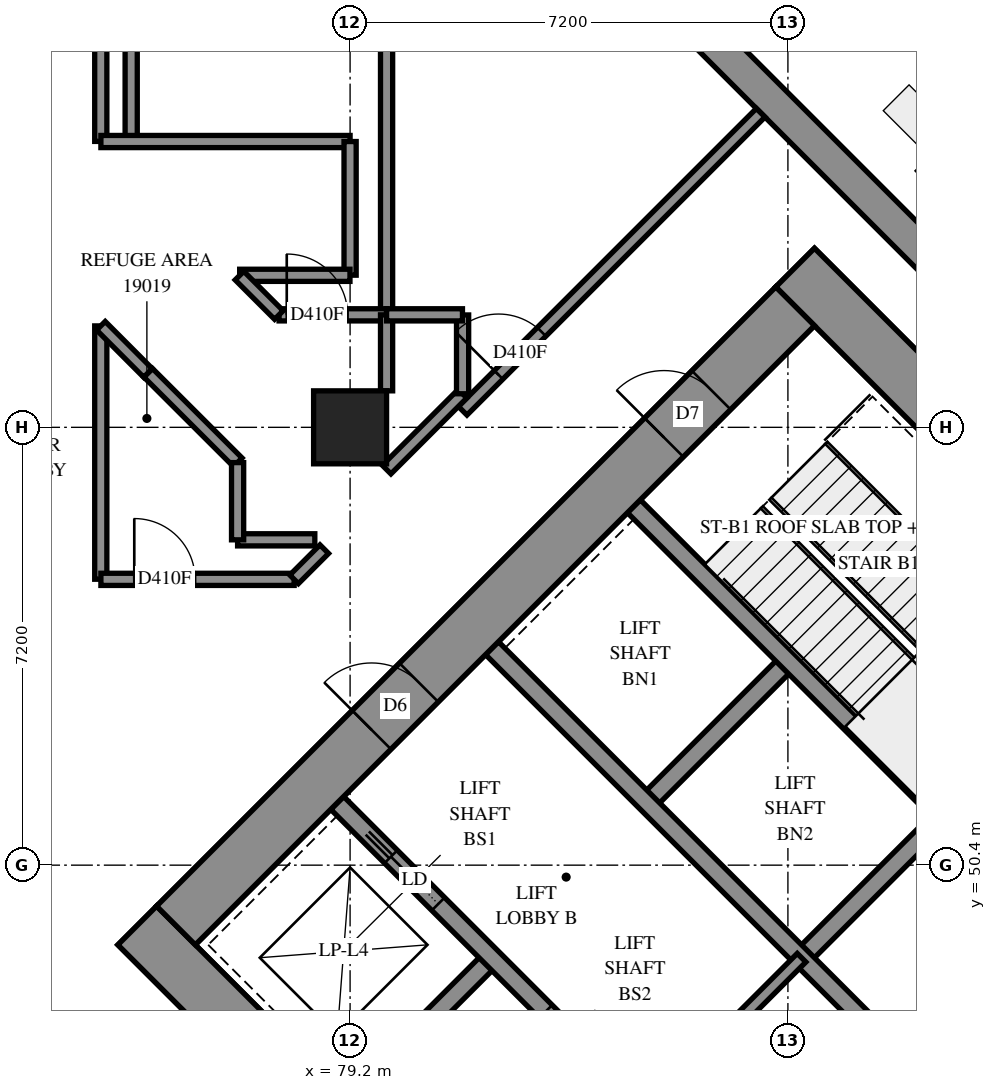
"""IFC4 building model, lengths in metres.
Left out: names, types, materials, properties, quantities, classifications, styles, units other than length and angle.
Written with IfcOpenShell. Run it as: python <this file> out.ifc"""

import sys

from ifc_helpers import new_model, si_unit, direction, frame, frame_2d, origin, origin_2d, place, context, subcontext, project, spatial, polyline, rectangle, outline, extrude, element, fill, save


model = new_model("IFC4")
c1 = context("Model", 3, precision=1e-05, world=origin(), true_north=direction((0.0, 1.0)))
c2 = subcontext(c1, "Body", "Model", "MODEL_VIEW")
j1 = project(units=[si_unit("LENGTHUNIT", "METRE"), si_unit("PLANEANGLEUNIT", "RADIAN")], contexts=[c1])
p1 = place(None, origin())
s1 = spatial("IfcSite", under=j1, at=p1, CompositionType="ELEMENT")
p2 = place(p1, origin())
s2 = spatial("IfcBuilding", under=s1, at=p2, CompositionType="ELEMENT")
p3 = place(p2, frame((0.0, 0.0, 72.0)))
s3 = spatial("IfcBuildingStorey", under=s2, at=p3, CompositionType="ELEMENT", Elevation=72.0)
p4 = place(p3, frame((79.2, 57.6, 0.0), z_axis=(0.0, 0.0, 1.0), x_axis=(1.0, 0.0, 0.0)))
e1 = element("IfcColumn", 1, at=p4, inside=s3, PredefinedType="COLUMN", context=c2, shape_type="SweptSolid", body=[
    extrude(rectangle(XDim=1.2, YDim=1.2, at=origin_2d()), origin(), (0.0, 0.0, 1.0), 4.7),
])
p5 = place(p3, frame((75.7, 49.408, -0.3), z_axis=(0.0, 0.0, 1.0), x_axis=(0.7071098676, -0.7071036948, 0.0)))
e2 = element("IfcWall", 2, at=p5, inside=s3, PredefinedType="SHEAR", context=c2, shape_type="SweptSolid", body=[
    extrude(rectangle(XDim=16.2, YDim=0.9, at=frame_2d((8.1, 0.0))), origin(), (0.0, 0.0, 1.0), 4.3),
])
p6 = place(p3, frame((86.519, 60.227, -0.3), z_axis=(0.0, 0.0, 1.0), x_axis=(0.7071036948, -0.7071098676, 0.0)))
e3 = element("IfcWall", 3, at=p6, inside=s3, PredefinedType="SHEAR", context=c2, shape_type="SweptSolid", body=[
    extrude(rectangle(XDim=16.2, YDim=0.9, at=frame_2d((8.1, 0.0))), origin(), (0.0, 0.0, 1.0), 4.3),
])
p7 = place(p6, frame((10.9, 0.0, 0.3)))
e4 = element("IfcOpeningElement", 4, at=p7, cuts=e3, PredefinedType="OPENING", context=c2, shape_type="SweptSolid", body=[
    extrude(rectangle(XDim=0.8, YDim=2.1, at=frame_2d((0.4, 1.05))), frame((0.0, 0.46, 0.0), z_axis=(0.0, -1.0, 0.0), x_axis=(1.0, 0.0, 0.0)), (0.0, 0.0, 1.0), 0.92),
])
p8 = place(p3, frame((76.336, 49.408, -0.3), z_axis=(0.0, 0.0, 1.0), x_axis=(0.7071067812, 0.7071067812, 0.0)))
e5 = element("IfcWall", 5, at=p8, inside=s3, PredefinedType="SHEAR", context=c2, shape_type="SweptSolid", body=[
    extrude(rectangle(XDim=14.4, YDim=0.9, at=frame_2d((7.2, 0.0))), origin(), (0.0, 0.0, 1.0), 4.3),
])
p9 = place(p8, frame((4.55, 0.0, 0.3)))
e6 = element("IfcOpeningElement", 6, at=p9, cuts=e5, PredefinedType="OPENING", context=c2, shape_type="SweptSolid", body=[
    extrude(rectangle(XDim=1.1, YDim=2.1, at=frame_2d((0.55, 1.05))), frame((0.0, 0.46, 0.0), z_axis=(0.0, -1.0, 0.0), x_axis=(1.0, 0.0, 0.0)), (0.0, 0.0, 1.0), 0.92),
])
p10 = place(p8, frame((11.35, 0.0, 0.3)))
e7 = element("IfcOpeningElement", 7, at=p10, cuts=e5, PredefinedType="OPENING", context=c2, shape_type="SweptSolid", body=[
    extrude(rectangle(XDim=1.1, YDim=2.1, at=frame_2d((0.55, 1.05))), frame((0.0, 0.46, 0.0), z_axis=(0.0, -1.0, 0.0), x_axis=(1.0, 0.0, 0.0)), (0.0, 0.0, 1.0), 0.92),
])
p11 = place(p3, frame((87.155, 38.589, -0.3), z_axis=(0.0, 0.0, 1.0), x_axis=(0.7071067812, 0.7071067812, 0.0)))
e8 = element("IfcWall", 8, at=p11, inside=s3, PredefinedType="SHEAR", context=c2, shape_type="SweptSolid", body=[
    extrude(rectangle(XDim=14.4, YDim=0.9, at=frame_2d((7.2, 0.0))), origin(), (0.0, 0.0, 1.0), 4.3),
])
p12 = place(p11, frame((4.55, 0.0, 0.3)))
e9 = element("IfcOpeningElement", 9, at=p12, cuts=e8, PredefinedType="OPENING", context=c2, shape_type="SweptSolid", body=[
    extrude(rectangle(XDim=1.1, YDim=2.1, at=frame_2d((0.55, 1.05))), frame((0.0, 0.46, 0.0), z_axis=(0.0, -1.0, 0.0), x_axis=(1.0, 0.0, 0.0)), (0.0, 0.0, 1.0), 0.92),
])
p13 = place(p11, frame((11.35, 0.0, 0.3)))
e10 = element("IfcOpeningElement", 10, at=p13, cuts=e8, PredefinedType="OPENING", context=c2, shape_type="SweptSolid", body=[
    extrude(rectangle(XDim=1.1, YDim=2.1, at=frame_2d((0.55, 1.05))), frame((0.0, 0.46, 0.0), z_axis=(0.0, -1.0, 0.0), x_axis=(1.0, 0.0, 0.0)), (0.0, 0.0, 1.0), 0.92),
])
for number, where, z_axis, x_axis in (
    (11, (79.2, 46.544, 0.0), (0.0, 0.0, 1.0), (0.707, 0.707, 0.0)),
    (12, (84.079, 51.423, 0.0), (0.0, 0.0, 1.0), (0.707, 0.707, 0.0)),
):
    element("IfcWall", number, at=place(p3, frame(where, z_axis=z_axis, x_axis=x_axis)), inside=s3, PredefinedType="SOLIDWALL", context=c2, shape_type="SweptSolid", body=[
        extrude(rectangle(XDim=3.3, YDim=0.3, at=frame_2d((1.65, 0.0))), origin(), (0.0, 0.0, 1.0), 4.7),
    ])
p14 = place(p3, frame((86.625, 48.878, 0.0), z_axis=(0.0, 0.0, 1.0), x_axis=(0.7071067812, 0.7071067812, 0.0)))
e13 = element("IfcWall", 13, at=p14, inside=s3, PredefinedType="SOLIDWALL", context=c2, shape_type="SweptSolid", body=[
    extrude(rectangle(XDim=3.3, YDim=0.3, at=frame_2d((1.65, 0.0))), origin(), (0.0, 0.0, 1.0), 4.7),
])
p15 = place(p3, frame((78.988, 51.423, 0.0), z_axis=(0.0, 0.0, 1.0), x_axis=(0.7071067812, -0.7071067812, 0.0)))
e14 = element("IfcWall", 14, at=p15, inside=s3, PredefinedType="SOLIDWALL", context=c2, shape_type="SweptSolid", body=[
    extrude(rectangle(XDim=14.4, YDim=0.3, at=frame_2d((7.2, 0.0))), origin(), (0.0, 0.0, 1.0), 4.7),
])
p16 = place(p15, frame((1.25, 0.0, 0.0)))
e15 = element("IfcOpeningElement", 15, at=p16, cuts=e14, PredefinedType="OPENING", context=c2, shape_type="SweptSolid", body=[
    extrude(rectangle(XDim=1.1, YDim=2.1, at=frame_2d((0.55, 1.05))), frame((0.0, 0.16, 0.0), z_axis=(0.0, -1.0, 0.0), x_axis=(1.0, 0.0, 0.0)), (0.0, 0.0, 1.0), 0.32),
])
p17 = place(p15, frame((4.85, 0.0, 0.0)))
e16 = element("IfcOpeningElement", 16, at=p17, cuts=e14, PredefinedType="OPENING", context=c2, shape_type="SweptSolid", body=[
    extrude(rectangle(XDim=1.1, YDim=2.1, at=frame_2d((0.55, 1.05))), frame((0.0, 0.16, 0.0), z_axis=(0.0, -1.0, 0.0), x_axis=(1.0, 0.0, 0.0)), (0.0, 0.0, 1.0), 0.32),
])
p18 = place(p15, frame((8.45, 0.0, 0.0)))
e17 = element("IfcOpeningElement", 17, at=p18, cuts=e14, PredefinedType="OPENING", context=c2, shape_type="SweptSolid", body=[
    extrude(rectangle(XDim=1.1, YDim=2.1, at=frame_2d((0.55, 1.05))), frame((0.0, 0.16, 0.0), z_axis=(0.0, -1.0, 0.0), x_axis=(1.0, 0.0, 0.0)), (0.0, 0.0, 1.0), 0.32),
])
p19 = place(p15, frame((12.05, 0.0, 0.0)))
e18 = element("IfcOpeningElement", 18, at=p19, cuts=e14, PredefinedType="OPENING", context=c2, shape_type="SweptSolid", body=[
    extrude(rectangle(XDim=1.1, YDim=2.1, at=frame_2d((0.55, 1.05))), frame((0.0, 0.16, 0.0), z_axis=(0.0, -1.0, 0.0), x_axis=(1.0, 0.0, 0.0)), (0.0, 0.0, 1.0), 0.32),
])
p20 = place(p3, frame((81.534, 53.969, 0.0), z_axis=(0.0, 0.0, 1.0), x_axis=(0.707103309, -0.7071102534, 0.0)))
e19 = element("IfcWall", 19, at=p20, inside=s3, PredefinedType="SOLIDWALL", context=c2, shape_type="SweptSolid", body=[
    extrude(rectangle(XDim=14.4, YDim=0.3, at=frame_2d((7.2, 0.0))), origin(), (0.0, 0.0, 1.0), 4.7),
])
p21 = place(p20, frame((12.05, 0.0, 0.0)))
e20 = element("IfcOpeningElement", 20, at=p21, cuts=e19, PredefinedType="OPENING", context=c2, shape_type="SweptSolid", body=[
    extrude(rectangle(XDim=1.1, YDim=2.1, at=frame_2d((0.55, 1.05))), frame((0.0, 0.16, 0.0), z_axis=(0.0, -1.0, 0.0), x_axis=(1.0, 0.0, 0.0)), (0.0, 0.0, 1.0), 0.32),
])
p22 = place(p3, frame((83.867, 56.302, 0.0), z_axis=(0.0, 0.0, 1.0), x_axis=(0.7071137256, -0.7070998367, 0.0)))
e21 = element("IfcWall", 21, at=p22, inside=s3, PredefinedType="SOLIDWALL", context=c2, shape_type="SweptSolid", body=[
    extrude(rectangle(XDim=7.2, YDim=0.3, at=frame_2d((3.6, 0.0))), origin(), (0.0, 0.0, 1.0), 4.7),
])
p23 = place(p3, frame((111.055, 38.059, 0.0), z_axis=(0.0, 0.0, 1.0), x_axis=(-0.7071078702, 0.7071056922, 0.0)))
e22 = element("IfcWall", 22, at=p23, inside=s3, PredefinedType="SOLIDWALL", context=c2, shape_type="SweptSolid", body=[
    extrude(outline(polyline([(-0.275, -0.275), (46.028, -0.275), (45.8, 0.275), (0.275, 0.275), (-0.275, -0.275)])), origin(), (0.0, 0.0, 1.0), 4.7),
])
p24 = place(p3, frame((112.929, 39.756, 0.0), z_axis=(0.0, 0.0, 1.0), x_axis=(-0.7071067812, 0.7071067812, 0.0)))
e23 = element("IfcWall", 23, at=p24, inside=s3, PredefinedType="SOLIDWALL", context=c2, shape_type="SweptSolid", body=[
    extrude(outline(polyline([(-0.1, -0.1), (47.126, -0.1), (47.044, 0.1), (0.1, 0.1), (-0.1, -0.1)])), origin(), (0.0, 0.0, 1.0), 4.7),
])
p25 = place(p3, frame((84.079, 46.332, 0.0), z_axis=(0.0, 0.0, 1.0), x_axis=(0.7071067812, 0.7071067812, 0.0)))
e24 = element("IfcWall", 24, at=p25, inside=s3, PredefinedType="PARTITIONING", context=c2, shape_type="SweptSolid", body=[
    extrude(rectangle(XDim=3.6, YDim=0.2, at=frame_2d((1.8, 0.0))), origin(), (0.0, 0.0, 1.0), 4.7),
])
p26 = place(p3, frame((75.6, 62.3, 0.0), z_axis=(0.0, 0.0, 1.0), x_axis=(0.0, 1.0, 0.0)))
e25 = element("IfcWall", 25, at=p26, inside=s3, PredefinedType="PARTITIONING", context=c2, shape_type="SweptSolid", body=[
    extrude(rectangle(XDim=7.95, YDim=0.2, at=frame_2d((3.975, 0.0))), origin(), (0.0, 0.0, 1.0), 4.7),
])
p27 = place(p3, frame((81.052, 57.873, 0.0), z_axis=(0.0, 0.0, 1.0), x_axis=(0.7070995666, 0.7071139957, 0.0)))
e26 = element("IfcWall", 26, at=p27, inside=s3, PredefinedType="PARTITIONING", context=c2, shape_type="SweptSolid", body=[
    extrude(rectangle(XDim=6.93, YDim=0.2, at=frame_2d((3.465, 0.0))), origin(), (0.0, 0.0, 1.0), 4.7),
])
p28 = place(p27, frame((0.835, 0.0, 0.0)))
e27 = element("IfcOpeningElement", 27, at=p28, cuts=e26, PredefinedType="OPENING", context=c2, shape_type="SweptSolid", body=[
    extrude(rectangle(XDim=1.0, YDim=2.1, at=frame_2d((0.5, 1.05))), frame((0.0, 0.11, 0.0), z_axis=(0.0, -1.0, 0.0), x_axis=(1.0, 0.0, 0.0)), (0.0, 0.0, 1.0), 0.22),
])
p29 = place(p3, frame((75.1, 62.302, 0.0), z_axis=(0.0, 0.0, 1.0), x_axis=(0.0, 1.0, 0.0)))
e28 = element("IfcWall", 28, at=p29, inside=s3, PredefinedType="PARTITIONING", context=c2, shape_type="SweptSolid", body=[
    extrude(rectangle(XDim=5.598, YDim=0.2, at=frame_2d((2.799, 0.0))), origin(), (0.0, 0.0, 1.0), 4.7),
])
p30 = place(p3, frame((79.8, 59.45, 0.0), z_axis=(0.0, 0.0, 1.0), x_axis=(0.0, 1.0, 0.0)))
e29 = element("IfcWall", 29, at=p30, inside=s3, PredefinedType="PARTITIONING", context=c2, shape_type="SweptSolid", body=[
    extrude(rectangle(XDim=4.75, YDim=0.2, at=frame_2d((2.375, 0.0))), origin(), (0.0, 0.0, 1.0), 4.7),
])
p31 = place(p3, frame((75.1, 55.102, 0.0), z_axis=(0.0, 0.0, 1.0), x_axis=(0.0, 1.0, 0.0)))
e30 = element("IfcWall", 30, at=p31, inside=s3, PredefinedType="PARTITIONING", context=c2, shape_type="SweptSolid", body=[
    extrude(rectangle(XDim=4.166, YDim=0.2, at=frame_2d((2.083, 0.0))), origin(), (0.0, 0.0, 1.0), 4.7),
])
p32 = place(p3, frame((75.102, 62.3, 0.0), z_axis=(0.0, 0.0, 1.0), x_axis=(1.0, 0.0, 0.0)))
e31 = element("IfcWall", 31, at=p32, inside=s3, PredefinedType="PARTITIONING", context=c2, shape_type="SweptSolid", body=[
    extrude(rectangle(XDim=4.098, YDim=0.2, at=frame_2d((2.049, 0.0))), origin(), (0.0, 0.0, 1.0), 4.7),
])
p33 = place(p3, frame((75.102, 55.1, 0.0), z_axis=(0.0, 0.0, 1.0), x_axis=(1.0, 0.0, 0.0)))
e32 = element("IfcWall", 32, at=p33, inside=s3, PredefinedType="PARTITIONING", context=c2, shape_type="SweptSolid", body=[
    extrude(rectangle(XDim=3.178, YDim=0.2, at=frame_2d((1.589, 0.0))), origin(), (0.0, 0.0, 1.0), 4.7),
])
p34 = place(p33, frame((0.549, 0.0, 0.0)))
e33 = element("IfcOpeningElement", 33, at=p34, cuts=e32, PredefinedType="OPENING", context=c2, shape_type="SweptSolid", body=[
    extrude(rectangle(XDim=1.0, YDim=2.1, at=frame_2d((0.5, 1.05))), frame((0.0, 0.11, 0.0), z_axis=(0.0, -1.0, 0.0), x_axis=(1.0, 0.0, 0.0)), (0.0, 0.0, 1.0), 0.22),
])
p35 = place(p3, frame((79.2, 60.102, 0.0), z_axis=(0.0, 0.0, 1.0), x_axis=(0.0, 1.0, 0.0)))
e34 = element("IfcWall", 34, at=p35, inside=s3, PredefinedType="PARTITIONING", context=c2, shape_type="SweptSolid", body=[
    extrude(rectangle(XDim=2.198, YDim=0.2, at=frame_2d((1.099, 0.0))), origin(), (0.0, 0.0, 1.0), 4.7),
])
p36 = place(p3, frame((75.879, 58.497, 0.0), z_axis=(0.0, 0.0, 1.0), x_axis=(0.7075866635, -0.706626573, 0.0)))
e35 = element("IfcWall", 35, at=p36, inside=s3, PredefinedType="PARTITIONING", context=c2, shape_type="SweptSolid", body=[
    extrude(rectangle(XDim=2.083, YDim=0.2, at=frame_2d((1.042, 0.0))), origin(), (0.0, 0.0, 1.0), 4.7),
])
p37 = place(p3, frame((77.384, 60.1, 0.0), z_axis=(0.0, 0.0, 1.0), x_axis=(1.0, 0.0, 0.0)))
e36 = element("IfcWall", 36, at=p37, inside=s3, PredefinedType="PARTITIONING", context=c2, shape_type="SweptSolid", body=[
    extrude(rectangle(XDim=1.814, YDim=0.2, at=frame_2d((0.907, 0.0))), origin(), (0.0, 0.0, 1.0), 4.7),
])
p38 = place(p3, frame((78.032, 59.45, 0.0), z_axis=(0.0, 0.0, 1.0), x_axis=(1.0, 0.0, 0.0)))
e37 = element("IfcWall", 37, at=p38, inside=s3, PredefinedType="PARTITIONING", context=c2, shape_type="SweptSolid", body=[
    extrude(rectangle(XDim=1.768, YDim=0.2, at=frame_2d((0.884, 0.0))), origin(), (0.0, 0.0, 1.0), 4.7),
])
p39 = place(p38, frame((0.126, 0.0, 0.0)))
e38 = element("IfcOpeningElement", 38, at=p39, cuts=e37, PredefinedType="OPENING", context=c2, shape_type="SweptSolid", body=[
    extrude(rectangle(XDim=1.0, YDim=2.1, at=frame_2d((0.5, 1.05))), frame((0.0, 0.11, 0.0), z_axis=(0.0, -1.0, 0.0), x_axis=(1.0, 0.0, 0.0)), (0.0, 0.0, 1.0), 0.22),
])
p40 = place(p3, frame((79.801, 56.905, 0.0), z_axis=(0.0, 0.0, 1.0), x_axis=(0.7071067812, 0.7071067812, 0.0)))
e39 = element("IfcWall", 39, at=p40, inside=s3, PredefinedType="PARTITIONING", context=c2, shape_type="SweptSolid", body=[
    extrude(rectangle(XDim=1.765, YDim=0.2, at=frame_2d((0.882, 0.0))), origin(), (0.0, 0.0, 1.0), 4.7),
])
p41 = place(p3, frame((81.05, 58.152, 0.0), z_axis=(0.0, 0.0, 1.0), x_axis=(0.0, 1.0, 0.0)))
e40 = element("IfcWall", 40, at=p41, inside=s3, PredefinedType="PARTITIONING", context=c2, shape_type="SweptSolid", body=[
    extrude(rectangle(XDim=1.296, YDim=0.2, at=frame_2d((0.648, 0.0))), origin(), (0.0, 0.0, 1.0), 4.7),
])
for number, where, z_axis, x_axis in (
    (41, (77.35, 55.75, 0.0), (0.0, 0.0, 1.0), (1.0, 0.0, 0.0)),
    (42, (77.35, 55.75, 0.0), (0.0, 0.0, 1.0), (0.0, 1.0, 0.0)),
):
    element("IfcWall", number, at=place(p3, frame(where, z_axis=z_axis, x_axis=x_axis)), inside=s3, PredefinedType="PARTITIONING", context=c2, shape_type="SweptSolid", body=[
        extrude(rectangle(XDim=1.27, YDim=0.2, at=frame_2d((0.635, 0.0))), origin(), (0.0, 0.0, 1.0), 4.7),
    ])
p42 = place(p3, frame((79.8, 58.2, 0.0), z_axis=(0.0, 0.0, 1.0), x_axis=(0.0, 1.0, 0.0)))
e43 = element("IfcWall", 43, at=p42, inside=s3, PredefinedType="PARTITIONING", context=c2, shape_type="SweptSolid", body=[
    extrude(rectangle(XDim=1.25, YDim=0.2, at=frame_2d((0.625, 0.0))), origin(), (0.0, 0.0, 1.0), 4.7),
])
p43 = place(p3, frame((79.8, 59.45, 0.0), z_axis=(0.0, 0.0, 1.0), x_axis=(1.0, 0.0, 0.0)))
e44 = element("IfcWall", 44, at=p43, inside=s3, PredefinedType="PARTITIONING", context=c2, shape_type="SweptSolid", body=[
    extrude(rectangle(XDim=1.248, YDim=0.2, at=frame_2d((0.624, 0.0))), origin(), (0.0, 0.0, 1.0), 4.7),
])
p44 = place(p3, frame((75.102, 59.27, 0.0), z_axis=(0.0, 0.0, 1.0), x_axis=(0.7061937975, -0.7080185876, 0.0)))
e45 = element("IfcWall", 45, at=p44, inside=s3, PredefinedType="PARTITIONING", context=c2, shape_type="SweptSolid", body=[
    extrude(rectangle(XDim=1.096, YDim=0.2, at=frame_2d((0.548, 0.0))), origin(), (0.0, 0.0, 1.0), 4.7),
])
p45 = place(p3, frame((77.381, 60.095, 0.0), z_axis=(0.0, 0.0, 1.0), x_axis=(0.7071067812, -0.7071067812, 0.0)))
e46 = element("IfcWall", 46, at=p45, inside=s3, PredefinedType="PARTITIONING", context=c2, shape_type="SweptSolid", body=[
    extrude(rectangle(XDim=0.916, YDim=0.2, at=frame_2d((0.458, 0.0))), origin(), (0.0, 0.0, 1.0), 4.7),
])
p46 = place(p3, frame((78.279, 55.1, 0.0), z_axis=(0.0, 0.0, 1.0), x_axis=(0.7071067812, 0.7071067812, 0.0)))
e47 = element("IfcWall", 47, at=p46, inside=s3, PredefinedType="PARTITIONING", context=c2, shape_type="SweptSolid", body=[
    extrude(rectangle(XDim=0.701, YDim=0.2, at=frame_2d((0.351, 0.0))), origin(), (0.0, 0.0, 1.0), 4.7),
])
p47 = place(p9, origin())
e48 = element("IfcDoor", 48, at=p47, inside=s3, OperationType="DOUBLE_DOOR_SINGLE_SWING", PredefinedType="DOOR", context=c2, shape_type="SweptSolid", body=[
    extrude(rectangle(XDim=1.1, YDim=2.1, at=frame_2d((0.55, 1.05))), frame((0.0, 0.025, 0.0), z_axis=(0.0, -1.0, 0.0), x_axis=(1.0, 0.0, 0.0)), (0.0, 0.0, 1.0), 0.05),
])
fill(e6, e48)
p48 = place(p10, origin())
e49 = element("IfcDoor", 49, at=p48, inside=s3, OperationType="SINGLE_SWING_LEFT", PredefinedType="DOOR", context=c2, shape_type="SweptSolid", body=[
    extrude(rectangle(XDim=1.1, YDim=2.1, at=frame_2d((0.55, 1.05))), frame((0.0, 0.025, 0.0), z_axis=(0.0, -1.0, 0.0), x_axis=(1.0, 0.0, 0.0)), (0.0, 0.0, 1.0), 0.05),
])
fill(e7, e49)
p49 = place(p16, origin())
e50 = element("IfcDoor", 50, at=p49, inside=s3, OperationType="SLIDING_TO_LEFT", PredefinedType="DOOR", context=c2, shape_type="SweptSolid", body=[
    extrude(rectangle(XDim=1.1, YDim=2.1, at=frame_2d((0.55, 1.05))), frame((0.0, 0.025, 0.0), z_axis=(0.0, -1.0, 0.0), x_axis=(1.0, 0.0, 0.0)), (0.0, 0.0, 1.0), 0.05),
])
fill(e15, e50)
p50 = place(p17, origin())
e51 = element("IfcDoor", 51, at=p50, inside=s3, OperationType="SLIDING_TO_RIGHT", PredefinedType="DOOR", context=c2, shape_type="SweptSolid", body=[
    extrude(rectangle(XDim=1.1, YDim=2.1, at=frame_2d((0.55, 1.05))), frame((0.0, 0.025, 0.0), z_axis=(0.0, -1.0, 0.0), x_axis=(1.0, 0.0, 0.0)), (0.0, 0.0, 1.0), 0.05),
])
fill(e16, e51)
p51 = place(p34, origin())
e52 = element("IfcDoor", 52, at=p51, inside=s3, OperationType="SINGLE_SWING_LEFT", PredefinedType="DOOR", context=c2, shape_type="SweptSolid", body=[
    extrude(rectangle(XDim=1.0, YDim=2.1, at=frame_2d((0.5, 1.05))), frame((0.0, 0.025, 0.0), z_axis=(0.0, -1.0, 0.0), x_axis=(1.0, 0.0, 0.0)), (0.0, 0.0, 1.0), 0.05),
])
fill(e33, e52)
p52 = place(p39, origin())
e53 = element("IfcDoor", 53, at=p52, inside=s3, OperationType="SINGLE_SWING_LEFT", PredefinedType="DOOR", context=c2, shape_type="SweptSolid", body=[
    extrude(rectangle(XDim=1.0, YDim=2.1, at=frame_2d((0.5, 1.05))), frame((0.0, 0.025, 0.0), z_axis=(0.0, -1.0, 0.0), x_axis=(1.0, 0.0, 0.0)), (0.0, 0.0, 1.0), 0.05),
])
fill(e38, e53)
p53 = place(p28, origin())
e54 = element("IfcDoor", 54, at=p53, inside=s3, OperationType="SINGLE_SWING_RIGHT", PredefinedType="DOOR", context=c2, shape_type="SweptSolid", body=[
    extrude(rectangle(XDim=1.0, YDim=2.1, at=frame_2d((0.5, 1.05))), frame((0.0, 0.025, 0.0), z_axis=(0.0, -1.0, 0.0), x_axis=(1.0, 0.0, 0.0)), (0.0, 0.0, 1.0), 0.05),
])
fill(e27, e54)
save(model, sys.argv[1])
